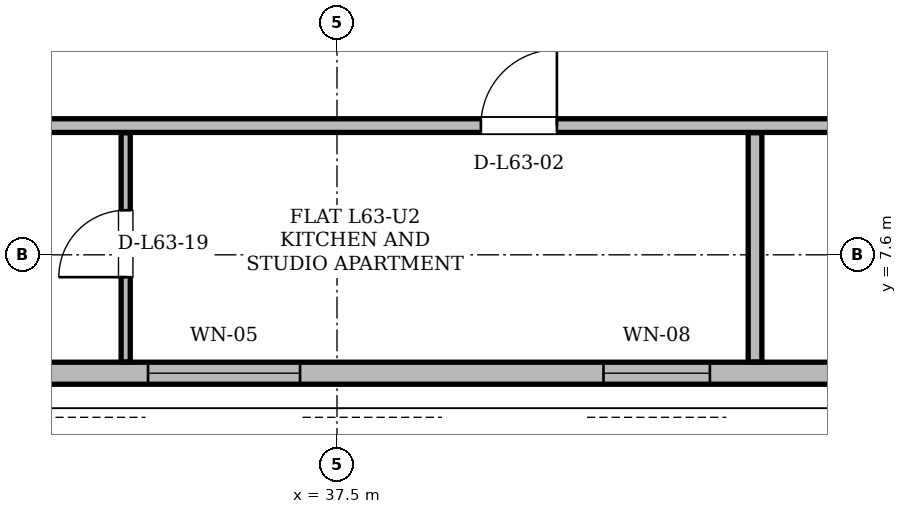
"""IFC4 building model, lengths in metres.
Left out: names, types, materials, properties, quantities, classifications, styles, units other than length and angle.
Written with IfcOpenShell. Run it as: python <this file> out.ifc"""

import sys

from ifc_helpers import new_model, si_unit, direction, frame, frame_2d, origin, place, context, subcontext, project, spatial, rectangle, extrude, element, fill, save


model = new_model("IFC4")
c1 = context("Model", 3, precision=1e-05, world=origin(), true_north=direction((0.0, 1.0)))
c2 = subcontext(c1, "Body", "Model", "MODEL_VIEW")
j1 = project(units=[si_unit("LENGTHUNIT", "METRE"), si_unit("PLANEANGLEUNIT", "RADIAN")], contexts=[c1])
p1 = place(None, origin())
s1 = spatial("IfcSite", under=j1, at=p1, CompositionType="ELEMENT")
p2 = place(p1, origin())
s2 = spatial("IfcBuilding", under=s1, at=p2, CompositionType="ELEMENT")
p3 = place(p2, frame((0.0, 0.0, 237.9)))
s3 = spatial("IfcBuildingStorey", under=s2, at=p3, CompositionType="ELEMENT", Elevation=237.9)
p4 = place(p3, frame((19.05, 6.042, 0.0), z_axis=(0.0, 0.0, 1.0), x_axis=(1.0, 0.0, 0.0)))
e1 = element("IfcWall", 1, at=p4, inside=s3, PredefinedType="SOLIDWALL", context=c2, shape_type="SweptSolid", body=[
    extrude(rectangle(XDim=36.9, YDim=0.29, at=frame_2d((18.45, 0.0))), origin(), (0.0, 0.0, 1.0), 2.677),
])
p5 = place(p4, frame((3.639, 0.0, 0.0)))
e2 = element("IfcOpeningElement", 2, at=p5, cuts=e1, PredefinedType="OPENING", context=c2, shape_type="SweptSolid", body=[
    extrude(rectangle(XDim=1.5, YDim=2.2, at=frame_2d((0.75, 1.1))), frame((0.0, 0.145, 0.0), z_axis=(0.0, -1.0, 0.0), x_axis=(1.0, 0.0, 0.0)), (0.0, 0.0, 1.0), 0.29),
])
p6 = place(p4, frame((27.365, 0.0, 0.0)))
e3 = element("IfcOpeningElement", 3, at=p6, cuts=e1, PredefinedType="OPENING", context=c2, shape_type="SweptSolid", body=[
    extrude(rectangle(XDim=1.5, YDim=2.2, at=frame_2d((0.75, 1.1))), frame((0.0, 0.145, 0.0), z_axis=(0.0, -1.0, 0.0), x_axis=(1.0, 0.0, 0.0)), (0.0, 0.0, 1.0), 0.29),
])
p7 = place(p4, frame((8.495, 0.0, 0.85)))
e4 = element("IfcOpeningElement", 4, at=p7, cuts=e1, PredefinedType="OPENING", context=c2, shape_type="SweptSolid", body=[
    extrude(rectangle(XDim=1.8, YDim=1.717, at=frame_2d((0.9, 0.858))), frame((0.0, 0.145, 0.0), z_axis=(0.0, -1.0, 0.0), x_axis=(1.0, 0.0, 0.0)), (0.0, 0.0, 1.0), 0.29),
])
p8 = place(p4, frame((15.964, 0.0, 0.85)))
e5 = element("IfcOpeningElement", 5, at=p8, cuts=e1, PredefinedType="OPENING", context=c2, shape_type="SweptSolid", body=[
    extrude(rectangle(XDim=2.0, YDim=1.717, at=frame_2d((1.0, 0.858))), frame((0.0, 0.145, 0.0), z_axis=(0.0, -1.0, 0.0), x_axis=(1.0, 0.0, 0.0)), (0.0, 0.0, 1.0), 0.29),
])
p9 = place(p4, frame((21.956, 0.0, 0.85)))
e6 = element("IfcOpeningElement", 6, at=p9, cuts=e1, PredefinedType="OPENING", context=c2, shape_type="SweptSolid", body=[
    extrude(rectangle(XDim=1.4, YDim=1.6, at=frame_2d((0.7, 0.8))), frame((0.0, 0.145, 0.0), z_axis=(0.0, -1.0, 0.0), x_axis=(1.0, 0.0, 0.0)), (0.0, 0.0, 1.0), 0.29),
])
p10 = place(p4, frame((32.487, 0.0, 0.85)))
e7 = element("IfcOpeningElement", 7, at=p10, cuts=e1, PredefinedType="OPENING", context=c2, shape_type="SweptSolid", body=[
    extrude(rectangle(XDim=1.2, YDim=1.48, at=frame_2d((0.6, 0.74))), frame((0.0, 0.145, 0.0), z_axis=(0.0, -1.0, 0.0), x_axis=(1.0, 0.0, 0.0)), (0.0, 0.0, 1.0), 0.29),
])
p11 = place(p3, frame((25.6, 9.3, 0.0), z_axis=(0.0, 0.0, 1.0), x_axis=(1.0, 0.0, 0.0)))
e8 = element("IfcWall", 8, at=p11, inside=s3, PredefinedType="PARTITIONING", context=c2, shape_type="SweptSolid", body=[
    extrude(rectangle(XDim=21.85, YDim=0.18, at=frame_2d((10.925, 0.0))), origin(), (0.0, 0.0, 1.0), 2.913),
])
p12 = place(p11, frame((2.325, 0.0, 0.0)))
e9 = element("IfcOpeningElement", 9, at=p12, cuts=e8, PredefinedType="OPENING", context=c2, shape_type="SweptSolid", body=[
    extrude(rectangle(XDim=1.0, YDim=2.18, at=frame_2d((0.5, 1.09))), frame((0.0, 0.09, 0.0), z_axis=(0.0, -1.0, 0.0), x_axis=(1.0, 0.0, 0.0)), (0.0, 0.0, 1.0), 0.18),
])
p13 = place(p11, frame((13.793, 0.0, 0.0)))
e10 = element("IfcOpeningElement", 10, at=p13, cuts=e8, PredefinedType="OPENING", context=c2, shape_type="SweptSolid", body=[
    extrude(rectangle(XDim=1.0, YDim=2.18, at=frame_2d((0.5, 1.09))), frame((0.0, 0.09, 0.0), z_axis=(0.0, -1.0, 0.0), x_axis=(1.0, 0.0, 0.0)), (0.0, 0.0, 1.0), 0.18),
])
p14 = place(p11, frame((18.812, 0.0, 0.0)))
e11 = element("IfcOpeningElement", 11, at=p14, cuts=e8, PredefinedType="OPENING", context=c2, shape_type="SweptSolid", body=[
    extrude(rectangle(XDim=1.0, YDim=2.18, at=frame_2d((0.5, 1.09))), frame((0.0, 0.09, 0.0), z_axis=(0.0, -1.0, 0.0), x_axis=(1.0, 0.0, 0.0)), (0.0, 0.0, 1.0), 0.18),
])
p15 = place(p3, frame((34.72, 6.191, 0.0), z_axis=(0.0, 0.0, 1.0), x_axis=(0.0, 1.0, 0.0)))
e12 = element("IfcWall", 12, at=p15, inside=s3, PredefinedType="PARTITIONING", context=c2, shape_type="SweptSolid", body=[
    extrude(rectangle(XDim=3.015, YDim=0.12, at=frame_2d((1.507, 0.0))), origin(), (0.0, 0.0, 1.0), 3.38),
])
p16 = place(p15, frame((1.115, 0.0, 0.0)))
e13 = element("IfcOpeningElement", 13, at=p16, cuts=e12, PredefinedType="OPENING", context=c2, shape_type="SweptSolid", body=[
    extrude(rectangle(XDim=0.88, YDim=2.08, at=frame_2d((0.44, 1.04))), frame((0.0, 0.06, 0.0), z_axis=(0.0, -1.0, 0.0), x_axis=(1.0, 0.0, 0.0)), (0.0, 0.0, 1.0), 0.12),
])
p17 = place(p3, frame((43.0, 6.191, 0.0), z_axis=(0.0, 0.0, 1.0), x_axis=(0.0, 1.0, 0.0)))
e14 = element("IfcWall", 14, at=p17, inside=s3, PredefinedType="PARTITIONING", context=c2, shape_type="SweptSolid", body=[
    extrude(rectangle(XDim=3.015, YDim=0.18, at=frame_2d((1.507, 0.0))), origin(), (0.0, 0.0, 1.0), 3.38),
])
p18 = place(p8, origin())
e15 = element("IfcWindow", 15, at=p18, inside=s3, PartitioningType="SINGLE_PANEL", PredefinedType="WINDOW", context=c2, shape_type="SweptSolid", body=[
    extrude(rectangle(XDim=2.0, YDim=1.717, at=frame_2d((1.0, 0.858))), frame((0.0, 0.03, 0.0), z_axis=(0.0, -1.0, 0.0), x_axis=(1.0, 0.0, 0.0)), (0.0, 0.0, 1.0), 0.06),
])
fill(e5, e15)
p19 = place(p9, origin())
e16 = element("IfcWindow", 16, at=p19, inside=s3, PartitioningType="SINGLE_PANEL", PredefinedType="WINDOW", context=c2, shape_type="SweptSolid", body=[
    extrude(rectangle(XDim=1.4, YDim=1.6, at=frame_2d((0.7, 0.8))), frame((0.0, 0.03, 0.0), z_axis=(0.0, -1.0, 0.0), x_axis=(1.0, 0.0, 0.0)), (0.0, 0.0, 1.0), 0.06),
])
fill(e6, e16)
p20 = place(p13, origin())
e17 = element("IfcDoor", 17, at=p20, inside=s3, OperationType="SINGLE_SWING_RIGHT", PredefinedType="DOOR", context=c2, shape_type="SweptSolid", body=[
    extrude(rectangle(XDim=1.0, YDim=2.18, at=frame_2d((0.5, 1.09))), frame((0.0, 0.025, 0.0), z_axis=(0.0, -1.0, 0.0), x_axis=(1.0, 0.0, 0.0)), (0.0, 0.0, 1.0), 0.05),
])
fill(e10, e17)
p21 = place(p16, origin())
e18 = element("IfcDoor", 18, at=p21, inside=s3, OperationType="SINGLE_SWING_LEFT", PredefinedType="DOOR", context=c2, shape_type="SweptSolid", body=[
    extrude(rectangle(XDim=0.88, YDim=2.08, at=frame_2d((0.44, 1.04))), frame((0.0, 0.025, 0.0), z_axis=(0.0, -1.0, 0.0), x_axis=(1.0, 0.0, 0.0)), (0.0, 0.0, 1.0), 0.05),
])
fill(e13, e18)
save(model, sys.argv[1])
